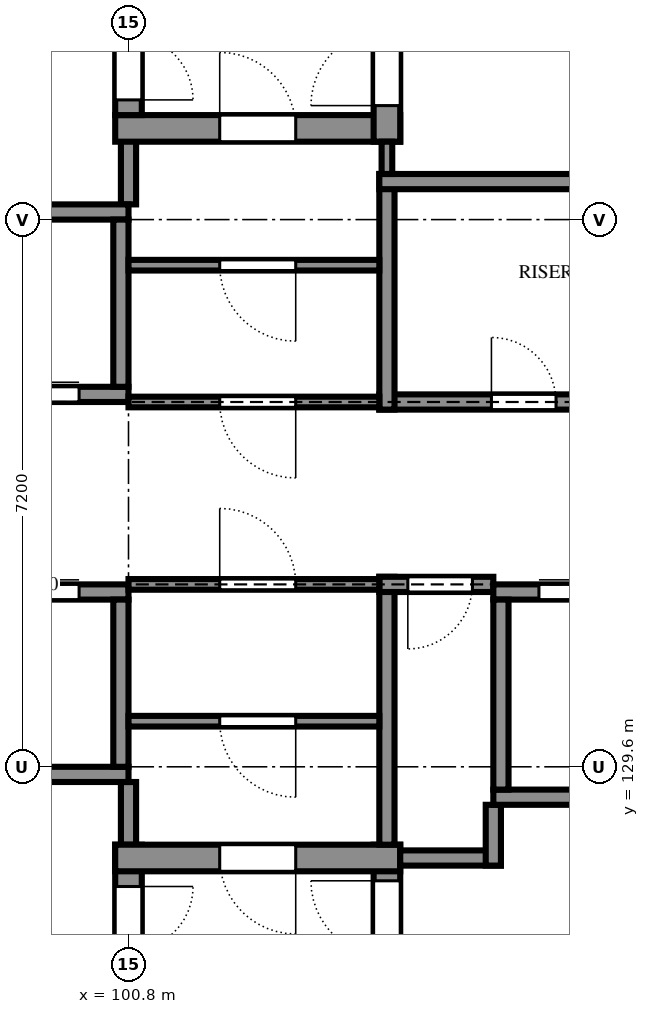
"""IFC4 building model, lengths in metres.
Left out: names, types, materials, properties, quantities, classifications, styles, units other than length and angle.
Written with IfcOpenShell. Run it as: python <this file> out.ifc"""

import sys

from ifc_helpers import new_model, si_unit, direction, frame, frame_2d, origin, place, context, subcontext, project, spatial, rectangle, extrude, element, fill, save


model = new_model("IFC4")
c1 = context("Model", 3, precision=1e-05, world=origin(), true_north=direction((0.0, 1.0)))
c2 = subcontext(c1, "Body", "Model", "MODEL_VIEW")
j1 = project(units=[si_unit("LENGTHUNIT", "METRE"), si_unit("PLANEANGLEUNIT", "RADIAN")], contexts=[c1])
p1 = place(None, origin())
s1 = spatial("IfcSite", under=j1, at=p1, CompositionType="ELEMENT")
p2 = place(p1, origin())
s2 = spatial("IfcBuilding", under=s1, at=p2, CompositionType="ELEMENT")
p3 = place(p2, frame((0.0, 0.0, 10.8)))
s3 = spatial("IfcBuildingStorey", under=s2, at=p3, CompositionType="ELEMENT", Elevation=10.8)
p4 = place(p3, frame((104.2, 125.1, 0.0), z_axis=(0.0, 0.0, 1.0), x_axis=(0.0, 1.0, 0.0)))
e1 = element("IfcWall", 1, at=p4, inside=s3, PredefinedType="SHEAR", context=c2, shape_type="SweptSolid", body=[
    extrude(rectangle(XDim=3.475, YDim=0.35, at=frame_2d((1.737, 0.0))), origin(), (0.0, 0.0, 1.0), 3.6),
])
p5 = place(p4, frame((2.0, 0.0, 0.0)))
e2 = element("IfcOpeningElement", 2, at=p5, cuts=e1, PredefinedType="OPENING", context=c2, shape_type="SweptSolid", body=[
    extrude(rectangle(XDim=1.0, YDim=2.1, at=frame_2d((0.5, 1.05))), frame((0.0, 0.185, 0.0), z_axis=(0.0, -1.0, 0.0), x_axis=(1.0, 0.0, 0.0)), (0.0, 0.0, 1.0), 0.37),
])
p6 = place(p3, frame((100.8, 128.575, 0.0), z_axis=(0.0, 0.0, 1.0), x_axis=(0.0, -1.0, 0.0)))
e3 = element("IfcWall", 3, at=p6, inside=s3, PredefinedType="SHEAR", context=c2, shape_type="SweptSolid", body=[
    extrude(rectangle(XDim=6.35, YDim=0.35, at=frame_2d((3.175, 0.0))), origin(), (0.0, 0.0, 1.0), 3.6),
])
p7 = place(p6, frame((0.55, 0.0, 0.0)))
e4 = element("IfcOpeningElement", 4, at=p7, cuts=e3, PredefinedType="OPENING", context=c2, shape_type="SweptSolid", body=[
    extrude(rectangle(XDim=0.85, YDim=2.1, at=frame_2d((0.425, 1.05))), frame((0.0, 0.185, 0.0), z_axis=(0.0, -1.0, 0.0), x_axis=(1.0, 0.0, 0.0)), (0.0, 0.0, 1.0), 0.37),
])
p8 = place(p3, frame((100.8, 128.575, 0.0), z_axis=(0.0, 0.0, 1.0), x_axis=(0.0, 1.0, 0.0)))
e5 = element("IfcWall", 5, at=p8, inside=s3, PredefinedType="SHEAR", context=c2, shape_type="SweptSolid", body=[
    extrude(rectangle(XDim=0.825, YDim=0.2, at=frame_2d((0.413, 0.0))), origin(), (0.0, 0.0, 1.0), 3.6),
])
p9 = place(p3, frame((104.375, 128.4, 0.0), z_axis=(0.0, 0.0, 1.0), x_axis=(-1.0, 0.0, 0.0)))
e6 = element("IfcWall", 6, at=p9, inside=s3, PredefinedType="SHEAR", context=c2, shape_type="SweptSolid", body=[
    extrude(rectangle(XDim=3.75, YDim=0.35, at=frame_2d((1.875, 0.0))), origin(), (0.0, 0.0, 1.0), 3.6),
])
p10 = place(p9, frame((1.375, 0.0, 0.0)))
e7 = element("IfcOpeningElement", 7, at=p10, cuts=e6, PredefinedType="OPENING", context=c2, shape_type="SweptSolid", body=[
    extrude(rectangle(XDim=1.0, YDim=2.1, at=frame_2d((0.5, 1.05))), frame((0.0, 0.185, 0.0), z_axis=(0.0, -1.0, 0.0), x_axis=(1.0, 0.0, 0.0)), (0.0, 0.0, 1.0), 0.37),
])
p11 = place(p3, frame((104.375, 128.4, 0.0), z_axis=(0.0, 0.0, 1.0), x_axis=(1.0, 0.0, 0.0)))
e8 = element("IfcWall", 8, at=p11, inside=s3, PredefinedType="SHEAR", context=c2, shape_type="SweptSolid", body=[
    extrude(rectangle(XDim=1.325, YDim=0.2, at=frame_2d((0.663, 0.0))), origin(), (0.0, 0.0, 1.0), 3.6),
])
p12 = place(p3, frame((105.6, 128.3, 0.0), z_axis=(0.0, 0.0, 1.0), x_axis=(0.0, 1.0, 0.0)))
e9 = element("IfcWall", 9, at=p12, inside=s3, PredefinedType="SHEAR", context=c2, shape_type="SweptSolid", body=[
    extrude(rectangle(XDim=0.8, YDim=0.2, at=frame_2d((0.4, 0.0))), origin(), (0.0, 0.0, 1.0), 3.6),
])
p13 = place(p3, frame((104.2, 132.1, 0.0), z_axis=(0.0, 0.0, 1.0), x_axis=(0.0, -1.0, 0.0)))
e10 = element("IfcWall", 10, at=p13, inside=s3, PredefinedType="SHEAR", context=c2, shape_type="SweptSolid", body=[
    extrude(rectangle(XDim=3.525, YDim=0.2, at=frame_2d((1.763, 0.0))), origin(), (0.0, 0.0, 1.0), 3.6),
])
p14 = place(p3, frame((105.6, 132.0, 0.0), z_axis=(0.0, 0.0, 1.0), x_axis=(-1.0, 0.0, 0.0)))
e11 = element("IfcWall", 11, at=p14, inside=s3, PredefinedType="SHEAR", context=c2, shape_type="SweptSolid", body=[
    extrude(rectangle(XDim=1.5, YDim=0.2, at=frame_2d((0.75, 0.0))), origin(), (0.0, 0.0, 1.0), 3.6),
])
p15 = place(p14, frame((0.275, 0.0, 0.0)))
e12 = element("IfcOpeningElement", 12, at=p15, cuts=e11, PredefinedType="OPENING", context=c2, shape_type="SweptSolid", body=[
    extrude(rectangle(XDim=0.85, YDim=2.1, at=frame_2d((0.425, 1.05))), frame((0.0, 0.11, 0.0), z_axis=(0.0, -1.0, 0.0), x_axis=(1.0, 0.0, 0.0)), (0.0, 0.0, 1.0), 0.22),
])
p16 = place(p3, frame((104.1, 134.4, 0.0), z_axis=(0.0, 0.0, 1.0), x_axis=(1.0, 0.0, 0.0)))
e13 = element("IfcWall", 13, at=p16, inside=s3, PredefinedType="SHEAR", context=c2, shape_type="SweptSolid", body=[
    extrude(rectangle(XDim=4.1, YDim=0.2, at=frame_2d((2.05, 0.0))), origin(), (0.0, 0.0, 1.0), 3.6),
])
p17 = place(p16, frame((1.475, 0.0, 0.0)))
e14 = element("IfcOpeningElement", 14, at=p17, cuts=e13, PredefinedType="OPENING", context=c2, shape_type="SweptSolid", body=[
    extrude(rectangle(XDim=0.85, YDim=2.1, at=frame_2d((0.425, 1.05))), frame((0.0, 0.11, 0.0), z_axis=(0.0, -1.0, 0.0), x_axis=(1.0, 0.0, 0.0)), (0.0, 0.0, 1.0), 0.22),
])
p18 = place(p3, frame((100.8, 137.0, 0.0), z_axis=(0.0, 0.0, 1.0), x_axis=(0.0, 1.0, 0.0)))
e15 = element("IfcWall", 15, at=p18, inside=s3, PredefinedType="SHEAR", context=c2, shape_type="SweptSolid", body=[
    extrude(rectangle(XDim=1.175, YDim=0.2, at=frame_2d((0.587, 0.0))), origin(), (0.0, 0.0, 1.0), 3.6),
])
p19 = place(p3, frame((104.2, 137.4, 0.0), z_axis=(0.0, 0.0, 1.0), x_axis=(0.0, -1.0, 0.0)))
e16 = element("IfcWall", 16, at=p19, inside=s3, PredefinedType="SHEAR", context=c2, shape_type="SweptSolid", body=[
    extrude(rectangle(XDim=3.1, YDim=0.2, at=frame_2d((1.55, 0.0))), origin(), (0.0, 0.0, 1.0), 3.6),
])
p20 = place(p3, frame((108.2, 137.3, 0.0), z_axis=(0.0, 0.0, 1.0), x_axis=(-1.0, 0.0, 0.0)))
e17 = element("IfcWall", 17, at=p20, inside=s3, PredefinedType="SHEAR", context=c2, shape_type="SweptSolid", body=[
    extrude(rectangle(XDim=4.1, YDim=0.2, at=frame_2d((2.05, 0.0))), origin(), (0.0, 0.0, 1.0), 3.6),
])
p21 = place(p3, frame((100.625, 138.0, 0.0), z_axis=(0.0, 0.0, 1.0), x_axis=(1.0, 0.0, 0.0)))
e18 = element("IfcWall", 18, at=p21, inside=s3, PredefinedType="SHEAR", context=c2, shape_type="SweptSolid", body=[
    extrude(rectangle(XDim=3.75, YDim=0.35, at=frame_2d((1.875, 0.0))), origin(), (0.0, 0.0, 1.0), 3.6),
])
p22 = place(p21, frame((1.375, 0.0, 0.0)))
e19 = element("IfcOpeningElement", 19, at=p22, cuts=e18, PredefinedType="OPENING", context=c2, shape_type="SweptSolid", body=[
    extrude(rectangle(XDim=1.0, YDim=2.1, at=frame_2d((0.5, 1.05))), frame((0.0, 0.185, 0.0), z_axis=(0.0, -1.0, 0.0), x_axis=(1.0, 0.0, 0.0)), (0.0, 0.0, 1.0), 0.37),
])
p23 = place(p3, frame((104.2, 137.825, 0.0), z_axis=(0.0, 0.0, 1.0), x_axis=(0.0, 1.0, 0.0)))
e20 = element("IfcWall", 20, at=p23, inside=s3, PredefinedType="SHEAR", context=c2, shape_type="SweptSolid", body=[
    extrude(rectangle(XDim=3.475, YDim=0.35, at=frame_2d((1.738, 0.0))), origin(), (0.0, 0.0, 1.0), 3.6),
])
p24 = place(p23, frame((0.475, 0.0, 0.0)))
e21 = element("IfcOpeningElement", 21, at=p24, cuts=e20, PredefinedType="OPENING", context=c2, shape_type="SweptSolid", body=[
    extrude(rectangle(XDim=1.0, YDim=2.1, at=frame_2d((0.5, 1.05))), frame((0.0, 0.185, 0.0), z_axis=(0.0, -1.0, 0.0), x_axis=(1.0, 0.0, 0.0)), (0.0, 0.0, 1.0), 0.37),
])
p25 = place(p3, frame((100.8, 144.175, 0.0), z_axis=(0.0, 0.0, 1.0), x_axis=(0.0, -1.0, 0.0)))
e22 = element("IfcWall", 22, at=p25, inside=s3, PredefinedType="SHEAR", context=c2, shape_type="SweptSolid", body=[
    extrude(rectangle(XDim=6.0, YDim=0.35, at=frame_2d((3.0, 0.0))), origin(), (0.0, 0.0, 1.0), 3.6),
])
p26 = place(p25, frame((4.95, 0.0, 0.0)))
e23 = element("IfcOpeningElement", 23, at=p26, cuts=e22, PredefinedType="OPENING", context=c2, shape_type="SweptSolid", body=[
    extrude(rectangle(XDim=0.85, YDim=2.1, at=frame_2d((0.425, 1.05))), frame((0.0, 0.185, 0.0), z_axis=(0.0, -1.0, 0.0), x_axis=(1.0, 0.0, 0.0)), (0.0, 0.0, 1.0), 0.37),
])
p27 = place(p3, frame((98.4, 129.5, 0.0), z_axis=(0.0, 0.0, 1.0), x_axis=(1.0, 0.0, 0.0)))
e24 = element("IfcWall", 24, at=p27, inside=s3, PredefinedType="SHEAR", context=c2, shape_type="SweptSolid", body=[
    extrude(rectangle(XDim=2.4, YDim=0.2, at=frame_2d((1.2, 0.0))), origin(), (0.0, 0.0, 1.0), 3.6),
])
p28 = place(p3, frame((98.4, 131.9, 0.0), z_axis=(0.0, 0.0, 1.0), x_axis=(1.0, 0.0, 0.0)))
e25 = element("IfcWall", 25, at=p28, inside=s3, PredefinedType="SHEAR", context=c2, shape_type="SweptSolid", body=[
    extrude(rectangle(XDim=2.4, YDim=0.2, at=frame_2d((1.2, 0.0))), origin(), (0.0, 0.0, 1.0), 3.6),
])
p29 = place(p28, frame((0.65, 0.0, 0.0)))
e26 = element("IfcOpeningElement", 26, at=p29, cuts=e25, PredefinedType="OPENING", context=c2, shape_type="SweptSolid", body=[
    extrude(rectangle(XDim=1.1, YDim=2.1, at=frame_2d((0.55, 1.05))), frame((0.0, 0.11, 0.0), z_axis=(0.0, -1.0, 0.0), x_axis=(1.0, 0.0, 0.0)), (0.0, 0.0, 1.0), 0.22),
])
p30 = place(p3, frame((100.7, 129.6, 0.0), z_axis=(0.0, 0.0, 1.0), x_axis=(0.0, 1.0, 0.0)))
e27 = element("IfcWall", 27, at=p30, inside=s3, PredefinedType="SHEAR", context=c2, shape_type="SweptSolid", body=[
    extrude(rectangle(XDim=2.2, YDim=0.2, at=frame_2d((1.1, 0.0))), origin(), (0.0, 0.0, 1.0), 3.6),
])
p31 = place(p3, frame((98.4, 134.5, 0.0), z_axis=(0.0, 0.0, 1.0), x_axis=(1.0, 0.0, 0.0)))
e28 = element("IfcWall", 28, at=p31, inside=s3, PredefinedType="SHEAR", context=c2, shape_type="SweptSolid", body=[
    extrude(rectangle(XDim=2.4, YDim=0.2, at=frame_2d((1.2, 0.0))), origin(), (0.0, 0.0, 1.0), 3.6),
])
p32 = place(p31, frame((0.65, 0.0, 0.0)))
e29 = element("IfcOpeningElement", 29, at=p32, cuts=e28, PredefinedType="OPENING", context=c2, shape_type="SweptSolid", body=[
    extrude(rectangle(XDim=1.1, YDim=2.1, at=frame_2d((0.55, 1.05))), frame((0.0, 0.11, 0.0), z_axis=(0.0, -1.0, 0.0), x_axis=(1.0, 0.0, 0.0)), (0.0, 0.0, 1.0), 0.22),
])
p33 = place(p3, frame((98.4, 136.9, 0.0), z_axis=(0.0, 0.0, 1.0), x_axis=(1.0, 0.0, 0.0)))
e30 = element("IfcWall", 30, at=p33, inside=s3, PredefinedType="SHEAR", context=c2, shape_type="SweptSolid", body=[
    extrude(rectangle(XDim=2.4, YDim=0.2, at=frame_2d((1.2, 0.0))), origin(), (0.0, 0.0, 1.0), 3.6),
])
p34 = place(p3, frame((100.7, 134.6, 0.0), z_axis=(0.0, 0.0, 1.0), x_axis=(0.0, 1.0, 0.0)))
e31 = element("IfcWall", 31, at=p34, inside=s3, PredefinedType="SHEAR", context=c2, shape_type="SweptSolid", body=[
    extrude(rectangle(XDim=2.2, YDim=0.2, at=frame_2d((1.1, 0.0))), origin(), (0.0, 0.0, 1.0), 3.6),
])
p35 = place(p3, frame((105.6, 129.2, 0.0), z_axis=(0.0, 0.0, 1.0), x_axis=(1.0, 0.0, 0.0)))
e32 = element("IfcWall", 32, at=p35, inside=s3, PredefinedType="SHEAR", context=c2, shape_type="SweptSolid", body=[
    extrude(rectangle(XDim=2.4, YDim=0.2, at=frame_2d((1.2, 0.0))), origin(), (0.0, 0.0, 1.0), 3.6),
])
p36 = place(p3, frame((105.6, 131.9, 0.0), z_axis=(0.0, 0.0, 1.0), x_axis=(1.0, 0.0, 0.0)))
e33 = element("IfcWall", 33, at=p36, inside=s3, PredefinedType="SHEAR", context=c2, shape_type="SweptSolid", body=[
    extrude(rectangle(XDim=2.4, YDim=0.2, at=frame_2d((1.2, 0.0))), origin(), (0.0, 0.0, 1.0), 3.6),
])
p37 = place(p36, frame((0.6, 0.0, 0.0)))
e34 = element("IfcOpeningElement", 34, at=p37, cuts=e33, PredefinedType="OPENING", context=c2, shape_type="SweptSolid", body=[
    extrude(rectangle(XDim=1.2, YDim=2.1, at=frame_2d((0.6, 1.05))), frame((0.0, 0.11, 0.0), z_axis=(0.0, -1.0, 0.0), x_axis=(1.0, 0.0, 0.0)), (0.0, 0.0, 1.0), 0.22),
])
p38 = place(p3, frame((105.7, 129.3, 0.0), z_axis=(0.0, 0.0, 1.0), x_axis=(0.0, 1.0, 0.0)))
e35 = element("IfcWall", 35, at=p38, inside=s3, PredefinedType="SHEAR", context=c2, shape_type="SweptSolid", body=[
    extrude(rectangle(XDim=2.5, YDim=0.2, at=frame_2d((1.25, 0.0))), origin(), (0.0, 0.0, 1.0), 3.6),
])
p39 = place(p3, frame((100.8, 130.2, 0.0), z_axis=(0.0, 0.0, 1.0), x_axis=(1.0, 0.0, 0.0)))
e36 = element("IfcWall", 36, at=p39, inside=s3, PredefinedType="PARTITIONING", context=c2, shape_type="SweptSolid", body=[
    extrude(rectangle(XDim=3.3, YDim=0.14, at=frame_2d((1.65, 0.0))), origin(), (0.0, 0.0, 1.0), 3.42),
])
p40 = place(p39, frame((1.2, 0.0, 0.0)))
e37 = element("IfcOpeningElement", 37, at=p40, cuts=e36, PredefinedType="OPENING", context=c2, shape_type="SweptSolid", body=[
    extrude(rectangle(XDim=1.0, YDim=2.1, at=frame_2d((0.5, 1.05))), frame((0.0, 0.08, 0.0), z_axis=(0.0, -1.0, 0.0), x_axis=(1.0, 0.0, 0.0)), (0.0, 0.0, 1.0), 0.16),
])
p41 = place(p3, frame((100.8, 132.0, 0.0), z_axis=(0.0, 0.0, 1.0), x_axis=(1.0, 0.0, 0.0)))
e38 = element("IfcWall", 38, at=p41, inside=s3, PredefinedType="PARTITIONING", context=c2, shape_type="SweptSolid", body=[
    extrude(rectangle(XDim=3.3, YDim=0.14, at=frame_2d((1.65, 0.0))), origin(), (0.0, 0.0, 1.0), 3.42),
])
p42 = place(p41, frame((1.2, 0.0, 0.0)))
e39 = element("IfcOpeningElement", 39, at=p42, cuts=e38, PredefinedType="OPENING", context=c2, shape_type="SweptSolid", body=[
    extrude(rectangle(XDim=1.0, YDim=2.1, at=frame_2d((0.5, 1.05))), frame((0.0, 0.08, 0.0), z_axis=(0.0, -1.0, 0.0), x_axis=(1.0, 0.0, 0.0)), (0.0, 0.0, 1.0), 0.16),
])
p43 = place(p3, frame((100.8, 134.4, 0.0), z_axis=(0.0, 0.0, 1.0), x_axis=(1.0, 0.0, 0.0)))
e40 = element("IfcWall", 40, at=p43, inside=s3, PredefinedType="PARTITIONING", context=c2, shape_type="SweptSolid", body=[
    extrude(rectangle(XDim=3.3, YDim=0.14, at=frame_2d((1.65, 0.0))), origin(), (0.0, 0.0, 1.0), 3.42),
])
p44 = place(p43, frame((1.2, 0.0, 0.0)))
e41 = element("IfcOpeningElement", 41, at=p44, cuts=e40, PredefinedType="OPENING", context=c2, shape_type="SweptSolid", body=[
    extrude(rectangle(XDim=1.0, YDim=2.1, at=frame_2d((0.5, 1.05))), frame((0.0, 0.08, 0.0), z_axis=(0.0, -1.0, 0.0), x_axis=(1.0, 0.0, 0.0)), (0.0, 0.0, 1.0), 0.16),
])
p45 = place(p3, frame((100.8, 136.2, 0.0), z_axis=(0.0, 0.0, 1.0), x_axis=(1.0, 0.0, 0.0)))
e42 = element("IfcWall", 42, at=p45, inside=s3, PredefinedType="PARTITIONING", context=c2, shape_type="SweptSolid", body=[
    extrude(rectangle(XDim=3.3, YDim=0.14, at=frame_2d((1.65, 0.0))), origin(), (0.0, 0.0, 1.0), 3.42),
])
p46 = place(p45, frame((1.2, 0.0, 0.0)))
e43 = element("IfcOpeningElement", 43, at=p46, cuts=e42, PredefinedType="OPENING", context=c2, shape_type="SweptSolid", body=[
    extrude(rectangle(XDim=1.0, YDim=2.1, at=frame_2d((0.5, 1.05))), frame((0.0, 0.08, 0.0), z_axis=(0.0, -1.0, 0.0), x_axis=(1.0, 0.0, 0.0)), (0.0, 0.0, 1.0), 0.16),
])
p47 = place(p3, frame((104.2, 137.4, 0.0), z_axis=(0.0, 0.0, 1.0), x_axis=(0.0, 1.0, 0.0)))
e44 = element("IfcWall", 44, at=p47, inside=s3, PredefinedType="PARTITIONING", context=c2, shape_type="SweptSolid", body=[
    extrude(rectangle(XDim=0.425, YDim=0.14, at=frame_2d((0.212, 0.0))), origin(), (0.0, 0.0, 1.0), 3.42),
])
p48 = place(p29, origin())
e45 = element("IfcDoor", 45, at=p48, inside=s3, OperationType="SLIDING_TO_LEFT", PredefinedType="DOOR", context=c2, shape_type="SweptSolid", body=[
    extrude(rectangle(XDim=1.1, YDim=2.1, at=frame_2d((0.55, 1.05))), frame((0.0, 0.025, 0.0), z_axis=(0.0, -1.0, 0.0), x_axis=(1.0, 0.0, 0.0)), (0.0, 0.0, 1.0), 0.05),
])
fill(e26, e45)
p49 = place(p32, origin())
e46 = element("IfcDoor", 46, at=p49, inside=s3, OperationType="SLIDING_TO_LEFT", PredefinedType="DOOR", context=c2, shape_type="SweptSolid", body=[
    extrude(rectangle(XDim=1.1, YDim=2.1, at=frame_2d((0.55, 1.05))), frame((0.0, 0.025, 0.0), z_axis=(0.0, -1.0, 0.0), x_axis=(1.0, 0.0, 0.0)), (0.0, 0.0, 1.0), 0.05),
])
fill(e29, e46)
p50 = place(p37, origin())
e47 = element("IfcDoor", 47, at=p50, inside=s3, OperationType="SLIDING_TO_LEFT", PredefinedType="DOOR", context=c2, shape_type="SweptSolid", body=[
    extrude(rectangle(XDim=1.2, YDim=2.1, at=frame_2d((0.6, 1.05))), frame((0.0, 0.025, 0.0), z_axis=(0.0, -1.0, 0.0), x_axis=(1.0, 0.0, 0.0)), (0.0, 0.0, 1.0), 0.05),
])
fill(e34, e47)
p51 = place(p40, frame((1.0, 0.0, 0.0), z_axis=(0.0, 0.0, 1.0), x_axis=(-1.0, 0.0, 0.0)))
e48 = element("IfcDoor", 48, at=p51, inside=s3, OperationType="SINGLE_SWING_RIGHT", PredefinedType="DOOR", context=c2, shape_type="SweptSolid", body=[
    extrude(rectangle(XDim=1.0, YDim=2.1, at=frame_2d((0.5, 1.05))), frame((0.0, 0.025, 0.0), z_axis=(0.0, -1.0, 0.0), x_axis=(1.0, 0.0, 0.0)), (0.0, 0.0, 1.0), 0.05),
])
fill(e37, e48)
p52 = place(p42, origin())
e49 = element("IfcDoor", 49, at=p52, inside=s3, OperationType="SINGLE_SWING_RIGHT", PredefinedType="DOOR", context=c2, shape_type="SweptSolid", body=[
    extrude(rectangle(XDim=1.0, YDim=2.1, at=frame_2d((0.5, 1.05))), frame((0.0, 0.025, 0.0), z_axis=(0.0, -1.0, 0.0), x_axis=(1.0, 0.0, 0.0)), (0.0, 0.0, 1.0), 0.05),
])
fill(e39, e49)
p53 = place(p44, frame((1.0, 0.0, 0.0), z_axis=(0.0, 0.0, 1.0), x_axis=(-1.0, 0.0, 0.0)))
e50 = element("IfcDoor", 50, at=p53, inside=s3, OperationType="SINGLE_SWING_RIGHT", PredefinedType="DOOR", context=c2, shape_type="SweptSolid", body=[
    extrude(rectangle(XDim=1.0, YDim=2.1, at=frame_2d((0.5, 1.05))), frame((0.0, 0.025, 0.0), z_axis=(0.0, -1.0, 0.0), x_axis=(1.0, 0.0, 0.0)), (0.0, 0.0, 1.0), 0.05),
])
fill(e41, e50)
p54 = place(p46, frame((1.0, 0.0, 0.0), z_axis=(0.0, 0.0, 1.0), x_axis=(-1.0, 0.0, 0.0)))
e51 = element("IfcDoor", 51, at=p54, inside=s3, OperationType="SINGLE_SWING_RIGHT", PredefinedType="DOOR", context=c2, shape_type="SweptSolid", body=[
    extrude(rectangle(XDim=1.0, YDim=2.1, at=frame_2d((0.5, 1.05))), frame((0.0, 0.025, 0.0), z_axis=(0.0, -1.0, 0.0), x_axis=(1.0, 0.0, 0.0)), (0.0, 0.0, 1.0), 0.05),
])
fill(e43, e51)
p55 = place(p10, origin())
e52 = element("IfcDoor", 52, at=p55, inside=s3, OperationType="SINGLE_SWING_RIGHT", PredefinedType="DOOR", context=c2, shape_type="SweptSolid", body=[
    extrude(rectangle(XDim=1.0, YDim=2.1, at=frame_2d((0.5, 1.05))), frame((0.0, 0.025, 0.0), z_axis=(0.0, -1.0, 0.0), x_axis=(1.0, 0.0, 0.0)), (0.0, 0.0, 1.0), 0.05),
])
fill(e7, e52)
p56 = place(p7, origin())
e53 = element("IfcDoor", 53, at=p56, inside=s3, OperationType="SINGLE_SWING_RIGHT", PredefinedType="DOOR", context=c2, shape_type="SweptSolid", body=[
    extrude(rectangle(XDim=0.85, YDim=2.1, at=frame_2d((0.425, 1.05))), frame((0.0, 0.025, 0.0), z_axis=(0.0, -1.0, 0.0), x_axis=(1.0, 0.0, 0.0)), (0.0, 0.0, 1.0), 0.05),
])
fill(e4, e53)
p57 = place(p5, origin())
e54 = element("IfcDoor", 54, at=p57, inside=s3, OperationType="SINGLE_SWING_LEFT", PredefinedType="DOOR", context=c2, shape_type="SweptSolid", body=[
    extrude(rectangle(XDim=1.0, YDim=2.1, at=frame_2d((0.5, 1.05))), frame((0.0, 0.025, 0.0), z_axis=(0.0, -1.0, 0.0), x_axis=(1.0, 0.0, 0.0)), (0.0, 0.0, 1.0), 0.05),
])
fill(e2, e54)
p58 = place(p15, origin())
e55 = element("IfcDoor", 55, at=p58, inside=s3, OperationType="SINGLE_SWING_LEFT", PredefinedType="DOOR", context=c2, shape_type="SweptSolid", body=[
    extrude(rectangle(XDim=0.85, YDim=2.1, at=frame_2d((0.425, 1.05))), frame((0.0, 0.025, 0.0), z_axis=(0.0, -1.0, 0.0), x_axis=(1.0, 0.0, 0.0)), (0.0, 0.0, 1.0), 0.05),
])
fill(e12, e55)
p59 = place(p17, origin())
e56 = element("IfcDoor", 56, at=p59, inside=s3, OperationType="SINGLE_SWING_RIGHT", PredefinedType="DOOR", context=c2, shape_type="SweptSolid", body=[
    extrude(rectangle(XDim=0.85, YDim=2.1, at=frame_2d((0.425, 1.05))), frame((0.0, 0.025, 0.0), z_axis=(0.0, -1.0, 0.0), x_axis=(1.0, 0.0, 0.0)), (0.0, 0.0, 1.0), 0.05),
])
fill(e14, e56)
p60 = place(p22, origin())
e57 = element("IfcDoor", 57, at=p60, inside=s3, OperationType="SINGLE_SWING_RIGHT", PredefinedType="DOOR", context=c2, shape_type="SweptSolid", body=[
    extrude(rectangle(XDim=1.0, YDim=2.1, at=frame_2d((0.5, 1.05))), frame((0.0, 0.025, 0.0), z_axis=(0.0, -1.0, 0.0), x_axis=(1.0, 0.0, 0.0)), (0.0, 0.0, 1.0), 0.05),
])
fill(e19, e57)
p61 = place(p26, origin())
e58 = element("IfcDoor", 58, at=p61, inside=s3, OperationType="SINGLE_SWING_LEFT", PredefinedType="DOOR", context=c2, shape_type="SweptSolid", body=[
    extrude(rectangle(XDim=0.85, YDim=2.1, at=frame_2d((0.425, 1.05))), frame((0.0, 0.025, 0.0), z_axis=(0.0, -1.0, 0.0), x_axis=(1.0, 0.0, 0.0)), (0.0, 0.0, 1.0), 0.05),
])
fill(e23, e58)
p62 = place(p24, origin())
e59 = element("IfcDoor", 59, at=p62, inside=s3, OperationType="SINGLE_SWING_RIGHT", PredefinedType="DOOR", context=c2, shape_type="SweptSolid", body=[
    extrude(rectangle(XDim=1.0, YDim=2.1, at=frame_2d((0.5, 1.05))), frame((0.0, 0.025, 0.0), z_axis=(0.0, -1.0, 0.0), x_axis=(1.0, 0.0, 0.0)), (0.0, 0.0, 1.0), 0.05),
])
fill(e21, e59)
save(model, sys.argv[1])
